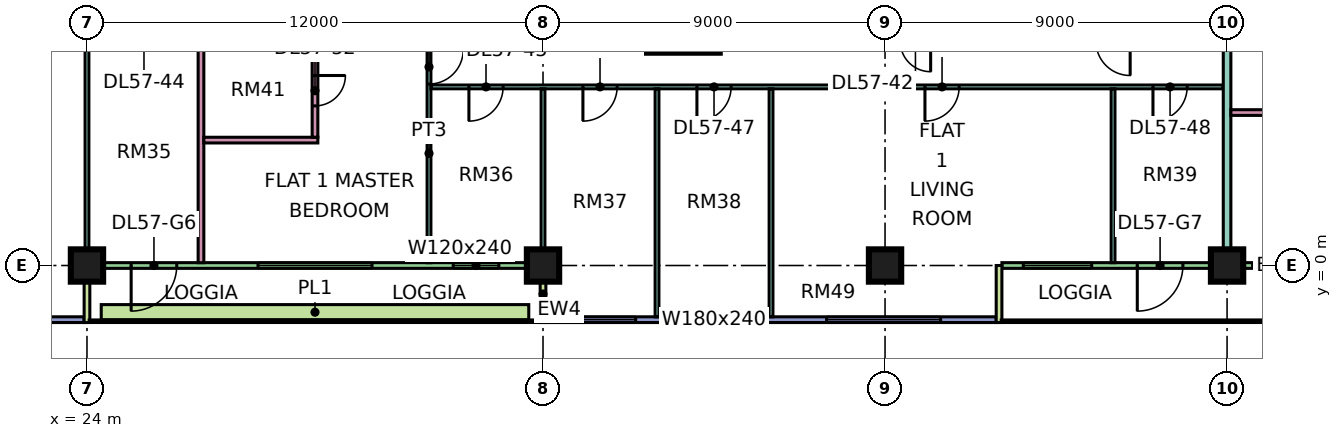
"""IFC4 building model, lengths in metres.
Left out: names, types, materials, properties, quantities, classifications, styles, units other than length and angle.
Written with IfcOpenShell. Run it as: python <this file> out.ifc"""

import sys

from ifc_helpers import new_model, si_unit, direction, frame, frame_2d, origin, origin_2d, place, context, subcontext, project, spatial, rectangle, extrude, element, fill, save


model = new_model("IFC4")
c1 = context("Model", 3, precision=1e-05, world=origin(), true_north=direction((0.0, 1.0)))
c2 = subcontext(c1, "Body", "Model", "MODEL_VIEW")
j1 = project(units=[si_unit("LENGTHUNIT", "METRE"), si_unit("PLANEANGLEUNIT", "RADIAN")], contexts=[c1])
p1 = place(None, origin())
s1 = spatial("IfcSite", under=j1, at=p1, CompositionType="ELEMENT")
p2 = place(p1, origin())
s2 = spatial("IfcBuilding", under=s1, at=p2, CompositionType="ELEMENT")
p3 = place(p2, frame((0.0, 0.0, 241.65)))
s3 = spatial("IfcBuildingStorey", under=s2, at=p3, CompositionType="ELEMENT", Elevation=241.65)
for number, where, z_axis, x_axis in (
    (1, (24.0, 0.0, 0.0), (0.0, 0.0, 1.0), (1.0, 0.0, 0.0)),
    (2, (36.0, 0.0, 0.0), (0.0, 0.0, 1.0), (1.0, 0.0, 0.0)),
    (3, (45.0, 0.0, 0.0), (0.0, 0.0, 1.0), (1.0, 0.0, 0.0)),
    (4, (54.0, 0.0, 0.0), (0.0, 0.0, 1.0), (1.0, 0.0, 0.0)),
):
    element("IfcColumn", number, at=place(p3, frame(where, z_axis=z_axis, x_axis=x_axis)), inside=s3, PredefinedType="COLUMN", context=c2, shape_type="SweptSolid", body=[
        extrude(rectangle(XDim=0.85, YDim=0.85, at=origin_2d()), origin(), (0.0, 0.0, 1.0), 3.75),
    ])
p4 = place(p3, frame((37.2, 5.725, 0.0), z_axis=(0.0, 0.0, 1.0), x_axis=(1.0, 0.0, 0.0)))
e5 = element("IfcWall", 5, at=p4, inside=s3, PredefinedType="SHEAR", context=c2, shape_type="SweptSolid", body=[
    extrude(rectangle(XDim=3.45, YDim=0.25, at=frame_2d((1.725, 0.0))), origin(), (0.0, 0.0, 1.0), 3.75),
])
p5 = place(p3, frame((12.5, -1.425, 0.0), z_axis=(0.0, 0.0, 1.0), x_axis=(1.0, 0.0, 0.0)))
e6 = element("IfcWall", 6, at=p5, inside=s3, PredefinedType="SOLIDWALL", context=c2, shape_type="SweptSolid", body=[
    extrude(rectangle(XDim=11.425, YDim=0.15, at=frame_2d((5.712, 0.0))), origin(), (0.0, 0.0, 1.0), 3.35),
])
p6 = place(p5, frame((0.35, 0.0, 0.45)))
e7 = element("IfcOpeningElement", 7, at=p6, cuts=e6, PredefinedType="OPENING", context=c2, shape_type="SweptSolid", body=[
    extrude(rectangle(XDim=1.8, YDim=2.4, at=frame_2d((0.9, 1.2))), frame((0.0, 0.085, 0.0), z_axis=(0.0, -1.0, 0.0), x_axis=(1.0, 0.0, 0.0)), (0.0, 0.0, 1.0), 0.17),
])
p7 = place(p5, frame((5.462, 0.0, 0.45)))
e8 = element("IfcOpeningElement", 8, at=p7, cuts=e6, PredefinedType="OPENING", context=c2, shape_type="SweptSolid", body=[
    extrude(rectangle(XDim=3.0, YDim=2.4, at=frame_2d((1.5, 1.2))), frame((0.0, 0.085, 0.0), z_axis=(0.0, -1.0, 0.0), x_axis=(1.0, 0.0, 0.0)), (0.0, 0.0, 1.0), 0.17),
])
p8 = place(p3, frame((24.075, 0.0, 0.0), z_axis=(0.0, 0.0, 1.0), x_axis=(1.0, 0.0, 0.0)))
e9 = element("IfcWall", 9, at=p8, inside=s3, PredefinedType="SOLIDWALL", context=c2, shape_type="SweptSolid", body=[
    extrude(rectangle(XDim=11.85, YDim=0.15, at=frame_2d((5.925, 0.0))), origin(), (0.0, 0.0, 1.0), 3.35),
])
p9 = place(p8, frame((1.087, 0.0, 0.0)))
e10 = element("IfcOpeningElement", 10, at=p9, cuts=e9, PredefinedType="OPENING", context=c2, shape_type="SweptSolid", body=[
    extrude(rectangle(XDim=1.2, YDim=2.4, at=frame_2d((0.6, 1.2))), frame((0.0, 0.085, 0.0), z_axis=(0.0, -1.0, 0.0), x_axis=(1.0, 0.0, 0.0)), (0.0, 0.0, 1.0), 0.17),
])
p10 = place(p8, frame((4.425, 0.0, 0.45)))
e11 = element("IfcOpeningElement", 11, at=p10, cuts=e9, PredefinedType="OPENING", context=c2, shape_type="SweptSolid", body=[
    extrude(rectangle(XDim=3.0, YDim=2.4, at=frame_2d((1.5, 1.2))), frame((0.0, 0.085, 0.0), z_axis=(0.0, -1.0, 0.0), x_axis=(1.0, 0.0, 0.0)), (0.0, 0.0, 1.0), 0.17),
])
p11 = place(p8, frame((9.562, 0.0, 0.45)))
e12 = element("IfcOpeningElement", 12, at=p11, cuts=e9, PredefinedType="OPENING", context=c2, shape_type="SweptSolid", body=[
    extrude(rectangle(XDim=1.2, YDim=2.4, at=frame_2d((0.6, 1.2))), frame((0.0, 0.085, 0.0), z_axis=(0.0, -1.0, 0.0), x_axis=(1.0, 0.0, 0.0)), (0.0, 0.0, 1.0), 0.17),
])
for number, where, z_axis, x_axis in (
    (13, (24.0, -1.5, 0.0), (0.0, 0.0, 1.0), (0.0, 1.0, 0.0)),
    (14, (36.0, -1.5, 0.0), (0.0, 0.0, 1.0), (0.0, 1.0, 0.0)),
):
    element("IfcWall", number, at=place(p3, frame(where, z_axis=z_axis, x_axis=x_axis)), inside=s3, PredefinedType="SOLIDWALL", context=c2, shape_type="SweptSolid", body=[
        extrude(rectangle(XDim=1.5, YDim=0.15, at=frame_2d((0.75, 0.0))), origin(), (0.0, 0.0, 1.0), 3.35),
    ])
p12 = place(p3, frame((36.075, -1.425, 0.0), z_axis=(0.0, 0.0, 1.0), x_axis=(1.0, 0.0, 0.0)))
e15 = element("IfcWall", 15, at=p12, inside=s3, PredefinedType="SOLIDWALL", context=c2, shape_type="SweptSolid", body=[
    extrude(rectangle(XDim=11.85, YDim=0.15, at=frame_2d((5.925, 0.0))), origin(), (0.0, 0.0, 1.0), 3.35),
])
p13 = place(p12, frame((0.562, 0.0, 0.45)))
e16 = element("IfcOpeningElement", 16, at=p13, cuts=e15, PredefinedType="OPENING", context=c2, shape_type="SweptSolid", body=[
    extrude(rectangle(XDim=1.8, YDim=2.4, at=frame_2d((0.9, 1.2))), frame((0.0, 0.085, 0.0), z_axis=(0.0, -1.0, 0.0), x_axis=(1.0, 0.0, 0.0)), (0.0, 0.0, 1.0), 0.17),
])
p14 = place(p12, frame((3.525, 0.0, 0.45)))
e17 = element("IfcOpeningElement", 17, at=p14, cuts=e15, PredefinedType="OPENING", context=c2, shape_type="SweptSolid", body=[
    extrude(rectangle(XDim=1.8, YDim=2.4, at=frame_2d((0.9, 1.2))), frame((0.0, 0.085, 0.0), z_axis=(0.0, -1.0, 0.0), x_axis=(1.0, 0.0, 0.0)), (0.0, 0.0, 1.0), 0.17),
])
p15 = place(p12, frame((7.387, 0.0, 0.45)))
e18 = element("IfcOpeningElement", 18, at=p15, cuts=e15, PredefinedType="OPENING", context=c2, shape_type="SweptSolid", body=[
    extrude(rectangle(XDim=3.0, YDim=2.4, at=frame_2d((1.5, 1.2))), frame((0.0, 0.085, 0.0), z_axis=(0.0, -1.0, 0.0), x_axis=(1.0, 0.0, 0.0)), (0.0, 0.0, 1.0), 0.17),
])
p16 = place(p3, frame((48.075, 0.0, 0.0), z_axis=(0.0, 0.0, 1.0), x_axis=(1.0, 0.0, 0.0)))
e19 = element("IfcWall", 19, at=p16, inside=s3, PredefinedType="SOLIDWALL", context=c2, shape_type="SweptSolid", body=[
    extrude(rectangle(XDim=13.35, YDim=0.15, at=frame_2d((6.675, 0.0))), origin(), (0.0, 0.0, 1.0), 3.35),
])
p17 = place(p16, frame((0.562, 0.0, 0.45)))
e20 = element("IfcOpeningElement", 20, at=p17, cuts=e19, PredefinedType="OPENING", context=c2, shape_type="SweptSolid", body=[
    extrude(rectangle(XDim=1.8, YDim=2.4, at=frame_2d((0.9, 1.2))), frame((0.0, 0.085, 0.0), z_axis=(0.0, -1.0, 0.0), x_axis=(1.0, 0.0, 0.0)), (0.0, 0.0, 1.0), 0.17),
])
p18 = place(p16, frame((3.562, 0.0, 0.0)))
e21 = element("IfcOpeningElement", 21, at=p18, cuts=e19, PredefinedType="OPENING", context=c2, shape_type="SweptSolid", body=[
    extrude(rectangle(XDim=1.2, YDim=2.4, at=frame_2d((0.6, 1.2))), frame((0.0, 0.085, 0.0), z_axis=(0.0, -1.0, 0.0), x_axis=(1.0, 0.0, 0.0)), (0.0, 0.0, 1.0), 0.17),
])
p19 = place(p16, frame((7.688, 0.0, 0.45)))
e22 = element("IfcOpeningElement", 22, at=p19, cuts=e19, PredefinedType="OPENING", context=c2, shape_type="SweptSolid", body=[
    extrude(rectangle(XDim=3.0, YDim=2.4, at=frame_2d((1.5, 1.2))), frame((0.0, 0.085, 0.0), z_axis=(0.0, -1.0, 0.0), x_axis=(1.0, 0.0, 0.0)), (0.0, 0.0, 1.0), 0.17),
])
p20 = place(p3, frame((48.0, -1.5, 0.0), z_axis=(0.0, 0.0, 1.0), x_axis=(0.0, 1.0, 0.0)))
e23 = element("IfcWall", 23, at=p20, inside=s3, PredefinedType="SOLIDWALL", context=c2, shape_type="SweptSolid", body=[
    extrude(rectangle(XDim=1.5, YDim=0.15, at=frame_2d((0.75, 0.0))), origin(), (0.0, 0.0, 1.0), 3.35),
])
p21 = place(p3, frame((24.375, -1.229, 0.0), z_axis=(0.0, 0.0, 1.0), x_axis=(1.0, 0.0, 0.0)))
e24 = element("IfcWall", 24, at=p21, inside=s3, PredefinedType="SOLIDWALL", context=c2, shape_type="SweptSolid", body=[
    extrude(rectangle(XDim=11.25, YDim=0.4, at=frame_2d((5.625, 0.0))), origin(), (0.0, 0.0, 1.0), 0.7),
])
p22 = place(p3, frame((24.0, 0.0, 0.0), z_axis=(0.0, 0.0, 1.0), x_axis=(0.0, 1.0, 0.0)))
e25 = element("IfcWall", 25, at=p22, inside=s3, PredefinedType="PARTITIONING", context=c2, shape_type="SweptSolid", body=[
    extrude(rectangle(XDim=5.825, YDim=0.1, at=frame_2d((2.913, 0.0))), origin(), (0.0, 0.0, 1.0), 3.35),
])
p23 = place(p3, frame((27.0, 0.074, 0.0), z_axis=(0.0, 0.0, 1.0), x_axis=(0.0, 1.0, 0.0)))
e26 = element("IfcWall", 26, at=p23, inside=s3, PredefinedType="PARTITIONING", context=c2, shape_type="SweptSolid", body=[
    extrude(rectangle(XDim=5.751, YDim=0.15, at=frame_2d((2.875, 0.0))), origin(), (0.0, 0.0, 1.0), 3.35),
])
p24 = place(p3, frame((27.075, 3.3, 0.0), z_axis=(0.0, 0.0, 1.0), x_axis=(1.0, 0.0, 0.0)))
e27 = element("IfcWall", 27, at=p24, inside=s3, PredefinedType="PARTITIONING", context=c2, shape_type="SweptSolid", body=[
    extrude(rectangle(XDim=3.0, YDim=0.15, at=frame_2d((1.5, 0.0))), origin(), (0.0, 0.0, 1.0), 3.35),
])
p25 = place(p3, frame((30.0, 3.375, 0.0), z_axis=(0.0, 0.0, 1.0), x_axis=(0.0, 1.0, 0.0)))
e28 = element("IfcWall", 28, at=p25, inside=s3, PredefinedType="PARTITIONING", context=c2, shape_type="SweptSolid", body=[
    extrude(rectangle(XDim=2.45, YDim=0.15, at=frame_2d((1.225, 0.0))), origin(), (0.0, 0.0, 1.0), 3.35),
])
p26 = place(p25, frame((0.825, 0.0, 0.0)))
e29 = element("IfcOpeningElement", 29, at=p26, cuts=e28, PredefinedType="OPENING", context=c2, shape_type="SweptSolid", body=[
    extrude(rectangle(XDim=0.8, YDim=2.1, at=frame_2d((0.4, 1.05))), frame((0.0, 0.085, 0.0), z_axis=(0.0, -1.0, 0.0), x_axis=(1.0, 0.0, 0.0)), (0.0, 0.0, 1.0), 0.17),
])
p27 = place(p3, frame((33.0, 0.074, 0.0), z_axis=(0.0, 0.0, 1.0), x_axis=(0.0, 1.0, 0.0)))
e30 = element("IfcWall", 30, at=p27, inside=s3, PredefinedType="PARTITIONING", context=c2, shape_type="SweptSolid", body=[
    extrude(rectangle(XDim=5.751, YDim=0.1, at=frame_2d((2.875, 0.0))), origin(), (0.0, 0.0, 1.0), 3.35),
])
p28 = place(p27, frame((4.701, 0.0, 0.0)))
e31 = element("IfcOpeningElement", 31, at=p28, cuts=e30, PredefinedType="OPENING", context=c2, shape_type="SweptSolid", body=[
    extrude(rectangle(XDim=0.9, YDim=2.1, at=frame_2d((0.45, 1.05))), frame((0.0, 0.06, 0.0), z_axis=(0.0, -1.0, 0.0), x_axis=(1.0, 0.0, 0.0)), (0.0, 0.0, 1.0), 0.12),
])
p29 = place(p3, frame((33.05, 4.7, 0.0), z_axis=(0.0, 0.0, 1.0), x_axis=(1.0, 0.0, 0.0)))
e32 = element("IfcWall", 32, at=p29, inside=s3, PredefinedType="PARTITIONING", context=c2, shape_type="SweptSolid", body=[
    extrude(rectangle(XDim=20.85, YDim=0.1, at=frame_2d((10.425, 0.0))), origin(), (0.0, 0.0, 1.0), 3.35),
])
p30 = place(p29, frame((1.0, 0.0, 0.0)))
e33 = element("IfcOpeningElement", 33, at=p30, cuts=e32, PredefinedType="OPENING", context=c2, shape_type="SweptSolid", body=[
    extrude(rectangle(XDim=0.9, YDim=2.1, at=frame_2d((0.45, 1.05))), frame((0.0, 0.06, 0.0), z_axis=(0.0, -1.0, 0.0), x_axis=(1.0, 0.0, 0.0)), (0.0, 0.0, 1.0), 0.12),
])
p31 = place(p29, frame((4.0, 0.0, 0.0)))
e34 = element("IfcOpeningElement", 34, at=p31, cuts=e32, PredefinedType="OPENING", context=c2, shape_type="SweptSolid", body=[
    extrude(rectangle(XDim=0.9, YDim=2.1, at=frame_2d((0.45, 1.05))), frame((0.0, 0.06, 0.0), z_axis=(0.0, -1.0, 0.0), x_axis=(1.0, 0.0, 0.0)), (0.0, 0.0, 1.0), 0.12),
])
p32 = place(p29, frame((7.0, 0.0, 0.0)))
e35 = element("IfcOpeningElement", 35, at=p32, cuts=e32, PredefinedType="OPENING", context=c2, shape_type="SweptSolid", body=[
    extrude(rectangle(XDim=0.9, YDim=2.1, at=frame_2d((0.45, 1.05))), frame((0.0, 0.06, 0.0), z_axis=(0.0, -1.0, 0.0), x_axis=(1.0, 0.0, 0.0)), (0.0, 0.0, 1.0), 0.12),
])
p33 = place(p29, frame((19.0, 0.0, 0.0)))
e36 = element("IfcOpeningElement", 36, at=p33, cuts=e32, PredefinedType="OPENING", context=c2, shape_type="SweptSolid", body=[
    extrude(rectangle(XDim=0.9, YDim=2.1, at=frame_2d((0.45, 1.05))), frame((0.0, 0.06, 0.0), z_axis=(0.0, -1.0, 0.0), x_axis=(1.0, 0.0, 0.0)), (0.0, 0.0, 1.0), 0.12),
])
p34 = place(p29, frame((13.0, 0.0, 0.0)))
e37 = element("IfcOpeningElement", 37, at=p34, cuts=e32, PredefinedType="OPENING", context=c2, shape_type="SweptSolid", body=[
    extrude(rectangle(XDim=0.9, YDim=2.1, at=frame_2d((0.45, 1.05))), frame((0.0, 0.06, 0.0), z_axis=(0.0, -1.0, 0.0), x_axis=(1.0, 0.0, 0.0)), (0.0, 0.0, 1.0), 0.12),
])
p35 = place(p3, frame((36.0, 0.0, 0.0), z_axis=(0.0, 0.0, 1.0), x_axis=(0.0, 1.0, 0.0)))
e38 = element("IfcWall", 38, at=p35, inside=s3, PredefinedType="PARTITIONING", context=c2, shape_type="SweptSolid", body=[
    extrude(rectangle(XDim=4.65, YDim=0.1, at=frame_2d((2.325, 0.0))), origin(), (0.0, 0.0, 1.0), 3.35),
])
p36 = place(p3, frame((39.0, -1.351, 0.0), z_axis=(0.0, 0.0, 1.0), x_axis=(0.0, 1.0, 0.0)))
e39 = element("IfcWall", 39, at=p36, inside=s3, PredefinedType="PARTITIONING", context=c2, shape_type="SweptSolid", body=[
    extrude(rectangle(XDim=6.001, YDim=0.1, at=frame_2d((3.0, 0.0))), origin(), (0.0, 0.0, 1.0), 3.35),
])
p37 = place(p3, frame((42.0, -1.35, 0.0), z_axis=(0.0, 0.0, 1.0), x_axis=(0.0, 1.0, 0.0)))
e40 = element("IfcWall", 40, at=p37, inside=s3, PredefinedType="PARTITIONING", context=c2, shape_type="SweptSolid", body=[
    extrude(rectangle(XDim=6.0, YDim=0.1, at=frame_2d((3.0, 0.0))), origin(), (0.0, 0.0, 1.0), 3.35),
])
p38 = place(p3, frame((51.0, 0.074, 0.0), z_axis=(0.0, 0.0, 1.0), x_axis=(0.0, 1.0, 0.0)))
e41 = element("IfcWall", 41, at=p38, inside=s3, PredefinedType="PARTITIONING", context=c2, shape_type="SweptSolid", body=[
    extrude(rectangle(XDim=4.576, YDim=0.1, at=frame_2d((2.288, 0.0))), origin(), (0.0, 0.0, 1.0), 3.35),
])
p39 = place(p3, frame((54.0, 0.074, 0.0), z_axis=(0.0, 0.0, 1.0), x_axis=(0.0, 1.0, 0.0)))
e42 = element("IfcWall", 42, at=p39, inside=s3, PredefinedType="PARTITIONING", context=c2, shape_type="SweptSolid", body=[
    extrude(rectangle(XDim=12.251, YDim=0.2, at=frame_2d((6.125, 0.0))), origin(), (0.0, 0.0, 1.0), 3.35),
])
p40 = place(p3, frame((54.1, 4.025, 0.0), z_axis=(0.0, 0.0, 1.0), x_axis=(1.0, 0.0, 0.0)))
e43 = element("IfcWall", 43, at=p40, inside=s3, PredefinedType="PARTITIONING", context=c2, shape_type="SweptSolid", body=[
    extrude(rectangle(XDim=2.825, YDim=0.15, at=frame_2d((1.413, 0.0))), origin(), (0.0, 0.0, 1.0), 3.35),
])
p41 = place(p9, frame((1.2, 0.0, 0.0), z_axis=(0.0, 0.0, 1.0), x_axis=(-1.0, 0.0, 0.0)))
e44 = element("IfcDoor", 44, at=p41, inside=s3, OperationType="DOUBLE_DOOR_SINGLE_SWING", PredefinedType="DOOR", context=c2, shape_type="SweptSolid", body=[
    extrude(rectangle(XDim=1.2, YDim=2.4, at=frame_2d((0.6, 1.2))), frame((0.0, 0.025, 0.0), z_axis=(0.0, -1.0, 0.0), x_axis=(1.0, 0.0, 0.0)), (0.0, 0.0, 1.0), 0.05),
])
fill(e10, e44)
p42 = place(p10, origin())
e45 = element("IfcWindow", 45, at=p42, inside=s3, PartitioningType="SINGLE_PANEL", PredefinedType="WINDOW", context=c2, shape_type="SweptSolid", body=[
    extrude(rectangle(XDim=3.0, YDim=2.4, at=frame_2d((1.5, 1.2))), frame((0.0, 0.03, 0.0), z_axis=(0.0, -1.0, 0.0), x_axis=(1.0, 0.0, 0.0)), (0.0, 0.0, 1.0), 0.06),
])
fill(e11, e45)
p43 = place(p11, origin())
e46 = element("IfcWindow", 46, at=p43, inside=s3, PartitioningType="SINGLE_PANEL", PredefinedType="WINDOW", context=c2, shape_type="SweptSolid", body=[
    extrude(rectangle(XDim=1.2, YDim=2.4, at=frame_2d((0.6, 1.2))), frame((0.0, 0.03, 0.0), z_axis=(0.0, -1.0, 0.0), x_axis=(1.0, 0.0, 0.0)), (0.0, 0.0, 1.0), 0.06),
])
fill(e12, e46)
p44 = place(p13, origin())
e47 = element("IfcWindow", 47, at=p44, inside=s3, PartitioningType="SINGLE_PANEL", PredefinedType="WINDOW", context=c2, shape_type="SweptSolid", body=[
    extrude(rectangle(XDim=1.8, YDim=2.4, at=frame_2d((0.9, 1.2))), frame((0.0, 0.03, 0.0), z_axis=(0.0, -1.0, 0.0), x_axis=(1.0, 0.0, 0.0)), (0.0, 0.0, 1.0), 0.06),
])
fill(e16, e47)
p45 = place(p14, origin())
e48 = element("IfcWindow", 48, at=p45, inside=s3, PartitioningType="SINGLE_PANEL", PredefinedType="WINDOW", context=c2, shape_type="SweptSolid", body=[
    extrude(rectangle(XDim=1.8, YDim=2.4, at=frame_2d((0.9, 1.2))), frame((0.0, 0.03, 0.0), z_axis=(0.0, -1.0, 0.0), x_axis=(1.0, 0.0, 0.0)), (0.0, 0.0, 1.0), 0.06),
])
fill(e17, e48)
p46 = place(p15, origin())
e49 = element("IfcWindow", 49, at=p46, inside=s3, PartitioningType="SINGLE_PANEL", PredefinedType="WINDOW", context=c2, shape_type="SweptSolid", body=[
    extrude(rectangle(XDim=3.0, YDim=2.4, at=frame_2d((1.5, 1.2))), frame((0.0, 0.03, 0.0), z_axis=(0.0, -1.0, 0.0), x_axis=(1.0, 0.0, 0.0)), (0.0, 0.0, 1.0), 0.06),
])
fill(e18, e49)
p47 = place(p17, origin())
e50 = element("IfcWindow", 50, at=p47, inside=s3, PartitioningType="SINGLE_PANEL", PredefinedType="WINDOW", context=c2, shape_type="SweptSolid", body=[
    extrude(rectangle(XDim=1.8, YDim=2.4, at=frame_2d((0.9, 1.2))), frame((0.0, 0.03, 0.0), z_axis=(0.0, -1.0, 0.0), x_axis=(1.0, 0.0, 0.0)), (0.0, 0.0, 1.0), 0.06),
])
fill(e20, e50)
p48 = place(p18, frame((1.2, 0.0, 0.0), z_axis=(0.0, 0.0, 1.0), x_axis=(-1.0, 0.0, 0.0)))
e51 = element("IfcDoor", 51, at=p48, inside=s3, OperationType="DOUBLE_DOOR_SINGLE_SWING", PredefinedType="DOOR", context=c2, shape_type="SweptSolid", body=[
    extrude(rectangle(XDim=1.2, YDim=2.4, at=frame_2d((0.6, 1.2))), frame((0.0, 0.025, 0.0), z_axis=(0.0, -1.0, 0.0), x_axis=(1.0, 0.0, 0.0)), (0.0, 0.0, 1.0), 0.05),
])
fill(e21, e51)
p49 = place(p30, frame((0.9, 0.0, 0.0), z_axis=(0.0, 0.0, 1.0), x_axis=(-1.0, 0.0, 0.0)))
e52 = element("IfcDoor", 52, at=p49, inside=s3, OperationType="SINGLE_SWING_LEFT", PredefinedType="DOOR", context=c2, shape_type="SweptSolid", body=[
    extrude(rectangle(XDim=0.9, YDim=2.1, at=frame_2d((0.45, 1.05))), frame((0.0, 0.025, 0.0), z_axis=(0.0, -1.0, 0.0), x_axis=(1.0, 0.0, 0.0)), (0.0, 0.0, 1.0), 0.05),
])
fill(e33, e52)
p50 = place(p31, frame((0.9, 0.0, 0.0), z_axis=(0.0, 0.0, 1.0), x_axis=(-1.0, 0.0, 0.0)))
e53 = element("IfcDoor", 53, at=p50, inside=s3, OperationType="SINGLE_SWING_LEFT", PredefinedType="DOOR", context=c2, shape_type="SweptSolid", body=[
    extrude(rectangle(XDim=0.9, YDim=2.1, at=frame_2d((0.45, 1.05))), frame((0.0, 0.025, 0.0), z_axis=(0.0, -1.0, 0.0), x_axis=(1.0, 0.0, 0.0)), (0.0, 0.0, 1.0), 0.05),
])
fill(e34, e53)
p51 = place(p32, frame((0.9, 0.0, 0.0), z_axis=(0.0, 0.0, 1.0), x_axis=(-1.0, 0.0, 0.0)))
e54 = element("IfcDoor", 54, at=p51, inside=s3, OperationType="SINGLE_SWING_LEFT", PredefinedType="DOOR", context=c2, shape_type="SweptSolid", body=[
    extrude(rectangle(XDim=0.9, YDim=2.1, at=frame_2d((0.45, 1.05))), frame((0.0, 0.025, 0.0), z_axis=(0.0, -1.0, 0.0), x_axis=(1.0, 0.0, 0.0)), (0.0, 0.0, 1.0), 0.05),
])
fill(e35, e54)
p52 = place(p33, frame((0.9, 0.0, 0.0), z_axis=(0.0, 0.0, 1.0), x_axis=(-1.0, 0.0, 0.0)))
e55 = element("IfcDoor", 55, at=p52, inside=s3, OperationType="SINGLE_SWING_LEFT", PredefinedType="DOOR", context=c2, shape_type="SweptSolid", body=[
    extrude(rectangle(XDim=0.9, YDim=2.1, at=frame_2d((0.45, 1.05))), frame((0.0, 0.025, 0.0), z_axis=(0.0, -1.0, 0.0), x_axis=(1.0, 0.0, 0.0)), (0.0, 0.0, 1.0), 0.05),
])
fill(e36, e55)
p53 = place(p28, origin())
e56 = element("IfcDoor", 56, at=p53, inside=s3, OperationType="SINGLE_SWING_RIGHT", PredefinedType="DOOR", context=c2, shape_type="SweptSolid", body=[
    extrude(rectangle(XDim=0.9, YDim=2.1, at=frame_2d((0.45, 1.05))), frame((0.0, 0.025, 0.0), z_axis=(0.0, -1.0, 0.0), x_axis=(1.0, 0.0, 0.0)), (0.0, 0.0, 1.0), 0.05),
])
fill(e31, e56)
p54 = place(p26, origin())
e57 = element("IfcDoor", 57, at=p54, inside=s3, OperationType="SINGLE_SWING_RIGHT", PredefinedType="DOOR", context=c2, shape_type="SweptSolid", body=[
    extrude(rectangle(XDim=0.8, YDim=2.1, at=frame_2d((0.4, 1.05))), frame((0.0, 0.025, 0.0), z_axis=(0.0, -1.0, 0.0), x_axis=(1.0, 0.0, 0.0)), (0.0, 0.0, 1.0), 0.05),
])
fill(e29, e57)
p55 = place(p34, frame((0.9, 0.0, 0.0), z_axis=(0.0, 0.0, 1.0), x_axis=(-1.0, 0.0, 0.0)))
e58 = element("IfcDoor", 58, at=p55, inside=s3, OperationType="SINGLE_SWING_LEFT", PredefinedType="DOOR", context=c2, shape_type="SweptSolid", body=[
    extrude(rectangle(XDim=0.9, YDim=2.1, at=frame_2d((0.45, 1.05))), frame((0.0, 0.025, 0.0), z_axis=(0.0, -1.0, 0.0), x_axis=(1.0, 0.0, 0.0)), (0.0, 0.0, 1.0), 0.05),
])
fill(e37, e58)
save(model, sys.argv[1])
